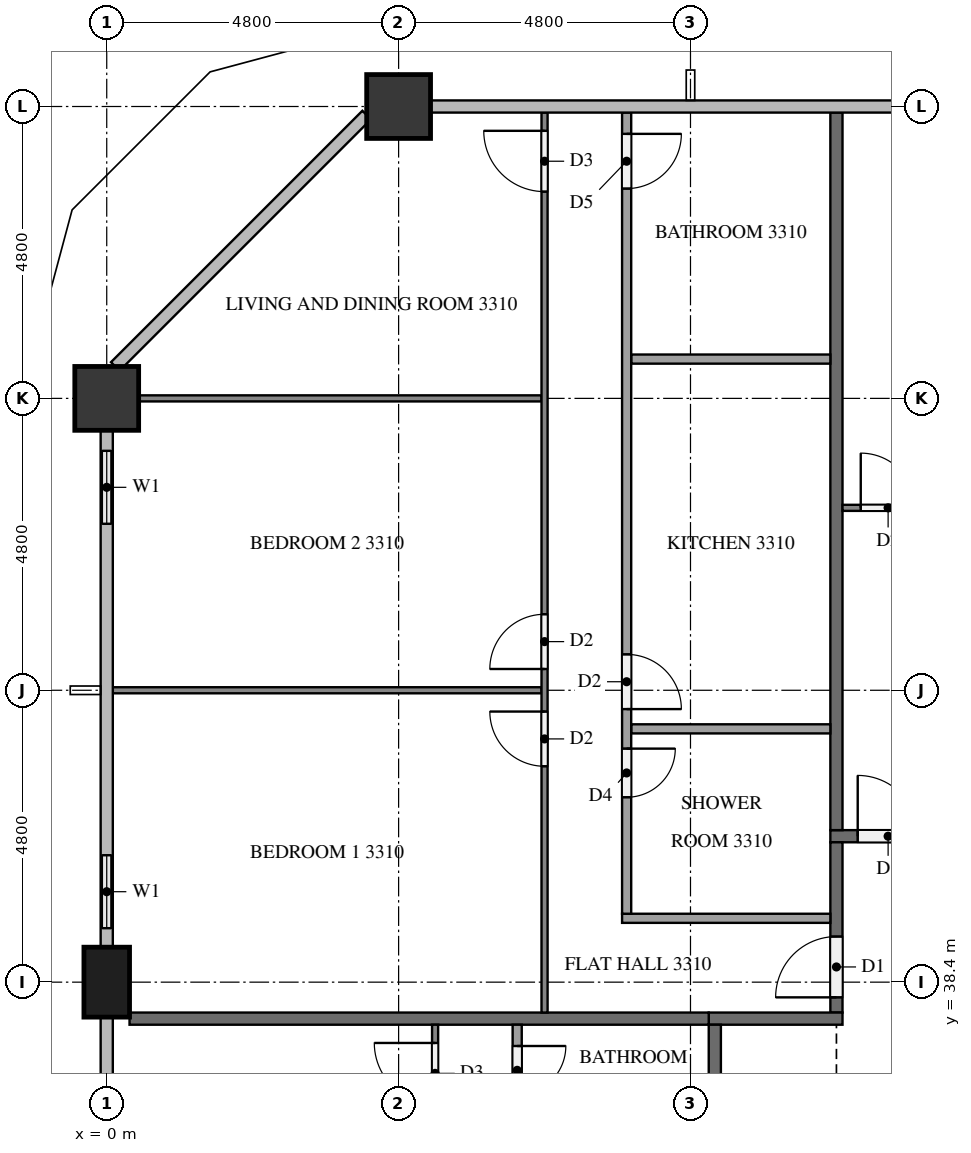
"""IFC4 building model, lengths in metres.
Left out: names, types, materials, properties, quantities, classifications, styles, units other than length and angle.
Written with IfcOpenShell. Run it as: python <this file> out.ifc"""

import sys

from ifc_helpers import new_model, si_unit, direction, frame, frame_2d, origin, origin_2d, place, context, subcontext, project, spatial, rectangle, extrude, element, fill, save


model = new_model("IFC4")
c1 = context("Model", 3, precision=1e-05, world=origin(), true_north=direction((0.0, 1.0)))
c2 = subcontext(c1, "Body", "Model", "MODEL_VIEW")
j1 = project(units=[si_unit("LENGTHUNIT", "METRE"), si_unit("PLANEANGLEUNIT", "RADIAN")], contexts=[c1])
p1 = place(None, origin())
s1 = spatial("IfcSite", under=j1, at=p1, CompositionType="ELEMENT")
p2 = place(p1, origin())
s2 = spatial("IfcBuilding", under=s1, at=p2, CompositionType="ELEMENT")
p3 = place(p2, frame((0.0, 0.0, 129.6)))
s3 = spatial("IfcBuildingStorey", under=s2, at=p3, CompositionType="ELEMENT", Elevation=129.6)
for number, where, z_axis, x_axis in (
    (1, (4.8, 52.8, 0.0), (0.0, 0.0, 1.0), (1.0, 0.0, 0.0)),
    (2, (0.0, 48.0, 0.0), (0.0, 0.0, 1.0), (1.0, 0.0, 0.0)),
):
    element("IfcColumn", number, at=place(p3, frame(where, z_axis=z_axis, x_axis=x_axis)), inside=s3, PredefinedType="COLUMN", context=c2, shape_type="SweptSolid", body=[
        extrude(rectangle(XDim=1.05, YDim=1.05, at=origin_2d()), origin(), (0.0, 0.0, 1.0), 3.2),
    ])
p4 = place(p3, frame((0.0, 38.4, 0.0), z_axis=(0.0, 0.0, 1.0), x_axis=(0.0, 1.0, 0.0)))
e3 = element("IfcColumn", 3, at=p4, inside=s3, PredefinedType="COLUMN", context=c2, shape_type="SweptSolid", body=[
    extrude(rectangle(XDim=1.15, YDim=0.75, at=origin_2d()), origin(), (0.0, 0.0, 1.0), 3.2),
])
p5 = place(p3, frame((0.0, 47.475, 0.0), z_axis=(0.0, 0.0, 1.0), x_axis=(0.0, -1.0, 0.0)))
e4 = element("IfcWall", 4, at=p5, inside=s3, PredefinedType="SOLIDWALL", context=c2, shape_type="SweptSolid", body=[
    extrude(rectangle(XDim=1.875, YDim=0.15, at=frame_2d((0.938, 0.0))), origin(), (0.0, 0.0, 1.0), 3.2),
])
p6 = place(p5, frame((0.337, 0.0, 0.9)))
e5 = element("IfcOpeningElement", 5, at=p6, cuts=e4, PredefinedType="OPENING", context=c2, shape_type="SweptSolid", body=[
    extrude(rectangle(XDim=1.2, YDim=1.4, at=frame_2d((0.6, 0.7))), frame((0.0, 0.085, 0.0), z_axis=(0.0, -1.0, 0.0), x_axis=(1.0, 0.0, 0.0)), (0.0, 0.0, 1.0), 0.17),
])
p7 = place(p3, frame((0.0, 40.8, 0.0), z_axis=(0.0, 0.0, 1.0), x_axis=(0.0, -1.0, 0.0)))
e6 = element("IfcWall", 6, at=p7, inside=s3, PredefinedType="SOLIDWALL", context=c2, shape_type="SweptSolid", body=[
    extrude(rectangle(XDim=1.825, YDim=0.15, at=frame_2d((0.913, 0.0))), origin(), (0.0, 0.0, 1.0), 3.2),
])
p8 = place(p7, frame((0.312, 0.0, 0.9)))
e7 = element("IfcOpeningElement", 7, at=p8, cuts=e6, PredefinedType="OPENING", context=c2, shape_type="SweptSolid", body=[
    extrude(rectangle(XDim=1.2, YDim=1.4, at=frame_2d((0.6, 0.7))), frame((0.0, 0.085, 0.0), z_axis=(0.0, -1.0, 0.0), x_axis=(1.0, 0.0, 0.0)), (0.0, 0.0, 1.0), 0.17),
])
p9 = place(p3, frame((11.9, 40.8, 0.0), z_axis=(0.0, 0.0, 1.0), x_axis=(1.0, 0.0, 0.0)))
e8 = element("IfcWall", 8, at=p9, inside=s3, PredefinedType="PARTITIONING", context=c2, shape_type="SweptSolid", body=[
    extrude(rectangle(XDim=38.6, YDim=0.2, at=frame_2d((19.3, 0.0))), origin(), (0.0, 0.0, 1.0), 3.2),
])
p10 = place(p9, frame((37.15, 0.0, 0.0)))
e9 = element("IfcOpeningElement", 9, at=p10, cuts=e8, PredefinedType="OPENING", context=c2, shape_type="SweptSolid", body=[
    extrude(rectangle(XDim=1.0, YDim=2.1, at=frame_2d((0.5, 1.05))), frame((0.0, 0.11, 0.0), z_axis=(0.0, -1.0, 0.0), x_axis=(1.0, 0.0, 0.0)), (0.0, 0.0, 1.0), 0.22),
])
p11 = place(p9, frame((10.05, 0.0, 0.0)))
e10 = element("IfcOpeningElement", 10, at=p11, cuts=e8, PredefinedType="OPENING", context=c2, shape_type="SweptSolid", body=[
    extrude(rectangle(XDim=1.0, YDim=2.1, at=frame_2d((0.5, 1.05))), frame((0.0, 0.11, 0.0), z_axis=(0.0, -1.0, 0.0), x_axis=(1.0, 0.0, 0.0)), (0.0, 0.0, 1.0), 0.22),
])
p12 = place(p9, frame((0.45, 0.0, 0.0)))
e11 = element("IfcOpeningElement", 11, at=p12, cuts=e8, PredefinedType="OPENING", context=c2, shape_type="SweptSolid", body=[
    extrude(rectangle(XDim=1.0, YDim=2.1, at=frame_2d((0.5, 1.05))), frame((0.0, 0.11, 0.0), z_axis=(0.0, -1.0, 0.0), x_axis=(1.0, 0.0, 0.0)), (0.0, 0.0, 1.0), 0.22),
])
p13 = place(p3, frame((12.0, 37.9, 0.0), z_axis=(0.0, 0.0, 1.0), x_axis=(0.0, 1.0, 0.0)))
e12 = element("IfcWall", 12, at=p13, inside=s3, PredefinedType="PARTITIONING", context=c2, shape_type="SweptSolid", body=[
    extrude(rectangle(XDim=2.8, YDim=0.2, at=frame_2d((1.4, 0.0))), origin(), (0.0, 0.0, 1.0), 3.2),
])
p14 = place(p13, frame((0.25, 0.0, 0.0)))
e13 = element("IfcOpeningElement", 13, at=p14, cuts=e12, PredefinedType="OPENING", context=c2, shape_type="SweptSolid", body=[
    extrude(rectangle(XDim=1.0, YDim=2.1, at=frame_2d((0.5, 1.05))), frame((0.0, 0.11, 0.0), z_axis=(0.0, -1.0, 0.0), x_axis=(1.0, 0.0, 0.0)), (0.0, 0.0, 1.0), 0.22),
])
p15 = place(p3, frame((12.1, 37.8, 0.0), z_axis=(0.0, 0.0, 1.0), x_axis=(-1.0, 0.0, 0.0)))
e14 = element("IfcWall", 14, at=p15, inside=s3, PredefinedType="PARTITIONING", context=c2, shape_type="SweptSolid", body=[
    extrude(rectangle(XDim=2.2, YDim=0.2, at=frame_2d((1.1, 0.0))), origin(), (0.0, 0.0, 1.0), 3.2),
])
p16 = place(p3, frame((10.0, 15.1, 0.0), z_axis=(0.0, 0.0, 1.0), x_axis=(0.0, 1.0, 0.0)))
e15 = element("IfcWall", 15, at=p16, inside=s3, PredefinedType="PARTITIONING", context=c2, shape_type="SweptSolid", body=[
    extrude(rectangle(XDim=22.6, YDim=0.2, at=frame_2d((11.3, 0.0))), origin(), (0.0, 0.0, 1.0), 3.2),
])
p17 = place(p16, frame((16.45, 0.0, 0.0)))
e16 = element("IfcOpeningElement", 16, at=p17, cuts=e15, PredefinedType="OPENING", context=c2, shape_type="SweptSolid", body=[
    extrude(rectangle(XDim=1.0, YDim=2.1, at=frame_2d((0.5, 1.05))), frame((0.0, 0.11, 0.0), z_axis=(0.0, -1.0, 0.0), x_axis=(1.0, 0.0, 0.0)), (0.0, 0.0, 1.0), 0.22),
])
p18 = place(p16, frame((0.25, 0.0, 0.0)))
e17 = element("IfcOpeningElement", 17, at=p18, cuts=e15, PredefinedType="OPENING", context=c2, shape_type="SweptSolid", body=[
    extrude(rectangle(XDim=1.0, YDim=2.1, at=frame_2d((0.5, 1.05))), frame((0.0, 0.11, 0.0), z_axis=(0.0, -1.0, 0.0), x_axis=(1.0, 0.0, 0.0)), (0.0, 0.0, 1.0), 0.22),
])
p19 = place(p3, frame((12.0, 52.7, 0.0), z_axis=(0.0, 0.0, 1.0), x_axis=(0.0, -1.0, 0.0)))
e18 = element("IfcWall", 18, at=p19, inside=s3, PredefinedType="PARTITIONING", context=c2, shape_type="SweptSolid", body=[
    extrude(rectangle(XDim=11.8, YDim=0.2, at=frame_2d((5.9, 0.0))), origin(), (0.0, 0.0, 1.0), 3.2),
])
p20 = place(p3, frame((0.375, 37.8, 0.0), z_axis=(0.0, 0.0, 1.0), x_axis=(1.0, 0.0, 0.0)))
e19 = element("IfcWall", 19, at=p20, inside=s3, PredefinedType="PARTITIONING", context=c2, shape_type="SweptSolid", body=[
    extrude(rectangle(XDim=9.525, YDim=0.2, at=frame_2d((4.762, 0.0))), origin(), (0.0, 0.0, 1.0), 3.2),
])
p21 = place(p3, frame((12.1, 46.2, 0.0), z_axis=(0.0, 0.0, 1.0), x_axis=(1.0, 0.0, 0.0)))
e20 = element("IfcWall", 20, at=p21, inside=s3, PredefinedType="PARTITIONING", context=c2, shape_type="SweptSolid", body=[
    extrude(rectangle(XDim=9.4, YDim=0.1, at=frame_2d((4.7, 0.0))), origin(), (0.0, 0.0, 1.0), 3.2),
])
p22 = place(p21, frame((0.3, 0.0, 0.0)))
e21 = element("IfcOpeningElement", 21, at=p22, cuts=e20, PredefinedType="OPENING", context=c2, shape_type="SweptSolid", body=[
    extrude(rectangle(XDim=0.9, YDim=2.1, at=frame_2d((0.45, 1.05))), frame((0.0, 0.06, 0.0), z_axis=(0.0, -1.0, 0.0), x_axis=(1.0, 0.0, 0.0)), (0.0, 0.0, 1.0), 0.12),
])
p23 = place(p21, frame((8.1, 0.0, 0.0)))
e22 = element("IfcOpeningElement", 22, at=p23, cuts=e20, PredefinedType="OPENING", context=c2, shape_type="SweptSolid", body=[
    extrude(rectangle(XDim=1.0, YDim=2.1, at=frame_2d((0.5, 1.05))), frame((0.0, 0.06, 0.0), z_axis=(0.0, -1.0, 0.0), x_axis=(1.0, 0.0, 0.0)), (0.0, 0.0, 1.0), 0.12),
])
p24 = place(p3, frame((7.15, 43.2, 0.0), z_axis=(0.0, 0.0, 1.0), x_axis=(-1.0, 0.0, 0.0)))
e23 = element("IfcWall", 23, at=p24, inside=s3, PredefinedType="PARTITIONING", context=c2, shape_type="SweptSolid", body=[
    extrude(rectangle(XDim=7.05, YDim=0.1, at=frame_2d((3.525, 0.0))), origin(), (0.0, 0.0, 1.0), 3.2),
])
p25 = place(p3, frame((7.15, 48.0, 0.0), z_axis=(0.0, 0.0, 1.0), x_axis=(-1.0, 0.0, 0.0)))
e24 = element("IfcWall", 24, at=p25, inside=s3, PredefinedType="PARTITIONING", context=c2, shape_type="SweptSolid", body=[
    extrude(rectangle(XDim=6.625, YDim=0.1, at=frame_2d((3.312, 0.0))), origin(), (0.0, 0.0, 1.0), 3.2),
])
p26 = place(p3, frame((7.2, 37.9, 0.0), z_axis=(0.0, 0.0, 1.0), x_axis=(0.0, 1.0, 0.0)))
e25 = element("IfcWall", 25, at=p26, inside=s3, PredefinedType="PARTITIONING", context=c2, shape_type="SweptSolid", body=[
    extrude(rectangle(XDim=14.8, YDim=0.1, at=frame_2d((7.4, 0.0))), origin(), (0.0, 0.0, 1.0), 3.2),
])
p27 = place(p26, frame((4.05, 0.0, 0.0)))
e26 = element("IfcOpeningElement", 26, at=p27, cuts=e25, PredefinedType="OPENING", context=c2, shape_type="SweptSolid", body=[
    extrude(rectangle(XDim=0.9, YDim=2.1, at=frame_2d((0.45, 1.05))), frame((0.0, 0.06, 0.0), z_axis=(0.0, -1.0, 0.0), x_axis=(1.0, 0.0, 0.0)), (0.0, 0.0, 1.0), 0.12),
])
p28 = place(p26, frame((5.65, 0.0, 0.0)))
e27 = element("IfcOpeningElement", 27, at=p28, cuts=e25, PredefinedType="OPENING", context=c2, shape_type="SweptSolid", body=[
    extrude(rectangle(XDim=0.9, YDim=2.1, at=frame_2d((0.45, 1.05))), frame((0.0, 0.06, 0.0), z_axis=(0.0, -1.0, 0.0), x_axis=(1.0, 0.0, 0.0)), (0.0, 0.0, 1.0), 0.12),
])
p29 = place(p26, frame((13.5, 0.0, 0.0)))
e28 = element("IfcOpeningElement", 28, at=p29, cuts=e25, PredefinedType="OPENING", context=c2, shape_type="SweptSolid", body=[
    extrude(rectangle(XDim=1.0, YDim=2.1, at=frame_2d((0.5, 1.05))), frame((0.0, 0.06, 0.0), z_axis=(0.0, -1.0, 0.0), x_axis=(1.0, 0.0, 0.0)), (0.0, 0.0, 1.0), 0.12),
])
for number, where, z_axis, x_axis in (
    (29, (11.9, 42.565, 0.0), (0.0, 0.0, 1.0), (-1.0, 0.0, 0.0)),
    (30, (11.9, 48.646, 0.0), (0.0, 0.0, 1.0), (-1.0, 0.0, 0.0)),
):
    element("IfcWall", number, at=place(p3, frame(where, z_axis=z_axis, x_axis=x_axis)), inside=s3, PredefinedType="PARTITIONING", context=c2, shape_type="SweptSolid", body=[
        extrude(rectangle(XDim=3.275, YDim=0.15, at=frame_2d((1.637, 0.0))), origin(), (0.0, 0.0, 1.0), 3.2),
    ])
p30 = place(p3, frame((11.9, 39.45, 0.0), z_axis=(0.0, 0.0, 1.0), x_axis=(-1.0, 0.0, 0.0)))
e31 = element("IfcWall", 31, at=p30, inside=s3, PredefinedType="PARTITIONING", context=c2, shape_type="SweptSolid", body=[
    extrude(rectangle(XDim=3.425, YDim=0.15, at=frame_2d((1.712, 0.0))), origin(), (0.0, 0.0, 1.0), 3.2),
])
p31 = place(p3, frame((8.55, 52.7, 0.0), z_axis=(0.0, 0.0, 1.0), x_axis=(0.0, -1.0, 0.0)))
e32 = element("IfcWall", 32, at=p31, inside=s3, PredefinedType="PARTITIONING", context=c2, shape_type="SweptSolid", body=[
    extrude(rectangle(XDim=13.175, YDim=0.15, at=frame_2d((6.587, 0.0))), origin(), (0.0, 0.0, 1.0), 3.2),
])
p32 = place(p31, frame((10.46, 0.0, 0.0)))
e33 = element("IfcOpeningElement", 33, at=p32, cuts=e32, PredefinedType="OPENING", context=c2, shape_type="SweptSolid", body=[
    extrude(rectangle(XDim=0.8, YDim=2.1, at=frame_2d((0.4, 1.05))), frame((0.0, 0.085, 0.0), z_axis=(0.0, -1.0, 0.0), x_axis=(1.0, 0.0, 0.0)), (0.0, 0.0, 1.0), 0.17),
])
p33 = place(p31, frame((8.91, 0.0, 0.0)))
e34 = element("IfcOpeningElement", 34, at=p33, cuts=e32, PredefinedType="OPENING", context=c2, shape_type="SweptSolid", body=[
    extrude(rectangle(XDim=0.9, YDim=2.1, at=frame_2d((0.45, 1.05))), frame((0.0, 0.085, 0.0), z_axis=(0.0, -1.0, 0.0), x_axis=(1.0, 0.0, 0.0)), (0.0, 0.0, 1.0), 0.17),
])
p34 = place(p31, frame((0.35, 0.0, 0.0)))
e35 = element("IfcOpeningElement", 35, at=p34, cuts=e32, PredefinedType="OPENING", context=c2, shape_type="SweptSolid", body=[
    extrude(rectangle(XDim=0.9, YDim=2.1, at=frame_2d((0.45, 1.05))), frame((0.0, 0.085, 0.0), z_axis=(0.0, -1.0, 0.0), x_axis=(1.0, 0.0, 0.0)), (0.0, 0.0, 1.0), 0.17),
])
p35 = place(p3, frame((5.4, 31.3, 0.0), z_axis=(0.0, 0.0, 1.0), x_axis=(0.0, 1.0, 0.0)))
e36 = element("IfcWall", 36, at=p35, inside=s3, PredefinedType="PARTITIONING", context=c2, shape_type="SweptSolid", body=[
    extrude(rectangle(XDim=6.4, YDim=0.1, at=frame_2d((3.2, 0.0))), origin(), (0.0, 0.0, 1.0), 3.2),
])
p36 = place(p35, frame((5.1, 0.0, 0.0)))
e37 = element("IfcOpeningElement", 37, at=p36, cuts=e36, PredefinedType="OPENING", context=c2, shape_type="SweptSolid", body=[
    extrude(rectangle(XDim=1.0, YDim=2.1, at=frame_2d((0.5, 1.05))), frame((0.0, 0.06, 0.0), z_axis=(0.0, -1.0, 0.0), x_axis=(1.0, 0.0, 0.0)), (0.0, 0.0, 1.0), 0.12),
])
p37 = place(p3, frame((6.75, 37.7, 0.0), z_axis=(0.0, 0.0, 1.0), x_axis=(0.0, -1.0, 0.0)))
e38 = element("IfcWall", 38, at=p37, inside=s3, PredefinedType="PARTITIONING", context=c2, shape_type="SweptSolid", body=[
    extrude(rectangle(XDim=4.775, YDim=0.15, at=frame_2d((2.387, 0.0))), origin(), (0.0, 0.0, 1.0), 3.2),
])
p38 = place(p37, frame((3.575, 0.0, 0.0)))
e39 = element("IfcOpeningElement", 39, at=p38, cuts=e38, PredefinedType="OPENING", context=c2, shape_type="SweptSolid", body=[
    extrude(rectangle(XDim=0.9, YDim=2.1, at=frame_2d((0.45, 1.05))), frame((0.0, 0.085, 0.0), z_axis=(0.0, -1.0, 0.0), x_axis=(1.0, 0.0, 0.0)), (0.0, 0.0, 1.0), 0.17),
])
p39 = place(p37, frame((0.35, 0.0, 0.0)))
e40 = element("IfcOpeningElement", 40, at=p39, cuts=e38, PredefinedType="OPENING", context=c2, shape_type="SweptSolid", body=[
    extrude(rectangle(XDim=0.8, YDim=2.1, at=frame_2d((0.4, 1.05))), frame((0.0, 0.085, 0.0), z_axis=(0.0, -1.0, 0.0), x_axis=(1.0, 0.0, 0.0)), (0.0, 0.0, 1.0), 0.17),
])
p40 = place(p6, origin())
e41 = element("IfcWindow", 41, at=p40, inside=s3, PartitioningType="SINGLE_PANEL", PredefinedType="WINDOW", context=c2, shape_type="SweptSolid", body=[
    extrude(rectangle(XDim=1.2, YDim=1.4, at=frame_2d((0.6, 0.7))), frame((0.0, 0.03, 0.0), z_axis=(0.0, -1.0, 0.0), x_axis=(1.0, 0.0, 0.0)), (0.0, 0.0, 1.0), 0.06),
])
fill(e5, e41)
p41 = place(p8, origin())
e42 = element("IfcWindow", 42, at=p41, inside=s3, PartitioningType="SINGLE_PANEL", PredefinedType="WINDOW", context=c2, shape_type="SweptSolid", body=[
    extrude(rectangle(XDim=1.2, YDim=1.4, at=frame_2d((0.6, 0.7))), frame((0.0, 0.03, 0.0), z_axis=(0.0, -1.0, 0.0), x_axis=(1.0, 0.0, 0.0)), (0.0, 0.0, 1.0), 0.06),
])
fill(e7, e42)
p42 = place(p12, origin())
e43 = element("IfcDoor", 43, at=p42, inside=s3, OperationType="SINGLE_SWING_LEFT", PredefinedType="DOOR", context=c2, shape_type="SweptSolid", body=[
    extrude(rectangle(XDim=1.0, YDim=2.1, at=frame_2d((0.5, 1.05))), frame((0.0, 0.025, 0.0), z_axis=(0.0, -1.0, 0.0), x_axis=(1.0, 0.0, 0.0)), (0.0, 0.0, 1.0), 0.05),
])
fill(e11, e43)
p43 = place(p14, origin())
e44 = element("IfcDoor", 44, at=p43, inside=s3, OperationType="SINGLE_SWING_LEFT", PredefinedType="DOOR", context=c2, shape_type="SweptSolid", body=[
    extrude(rectangle(XDim=1.0, YDim=2.1, at=frame_2d((0.5, 1.05))), frame((0.0, 0.025, 0.0), z_axis=(0.0, -1.0, 0.0), x_axis=(1.0, 0.0, 0.0)), (0.0, 0.0, 1.0), 0.05),
])
fill(e13, e44)
p44 = place(p22, origin())
e45 = element("IfcDoor", 45, at=p44, inside=s3, OperationType="SINGLE_SWING_LEFT", PredefinedType="DOOR", context=c2, shape_type="SweptSolid", body=[
    extrude(rectangle(XDim=0.9, YDim=2.1, at=frame_2d((0.45, 1.05))), frame((0.0, 0.025, 0.0), z_axis=(0.0, -1.0, 0.0), x_axis=(1.0, 0.0, 0.0)), (0.0, 0.0, 1.0), 0.05),
])
fill(e21, e45)
p45 = place(p27, origin())
e46 = element("IfcDoor", 46, at=p45, inside=s3, OperationType="SINGLE_SWING_RIGHT", PredefinedType="DOOR", context=c2, shape_type="SweptSolid", body=[
    extrude(rectangle(XDim=0.9, YDim=2.1, at=frame_2d((0.45, 1.05))), frame((0.0, 0.025, 0.0), z_axis=(0.0, -1.0, 0.0), x_axis=(1.0, 0.0, 0.0)), (0.0, 0.0, 1.0), 0.05),
])
fill(e26, e46)
p46 = place(p28, origin())
e47 = element("IfcDoor", 47, at=p46, inside=s3, OperationType="SINGLE_SWING_LEFT", PredefinedType="DOOR", context=c2, shape_type="SweptSolid", body=[
    extrude(rectangle(XDim=0.9, YDim=2.1, at=frame_2d((0.45, 1.05))), frame((0.0, 0.025, 0.0), z_axis=(0.0, -1.0, 0.0), x_axis=(1.0, 0.0, 0.0)), (0.0, 0.0, 1.0), 0.05),
])
fill(e27, e47)
p47 = place(p29, origin())
e48 = element("IfcDoor", 48, at=p47, inside=s3, OperationType="SINGLE_SWING_RIGHT", PredefinedType="DOOR", context=c2, shape_type="SweptSolid", body=[
    extrude(rectangle(XDim=1.0, YDim=2.1, at=frame_2d((0.5, 1.05))), frame((0.0, 0.025, 0.0), z_axis=(0.0, -1.0, 0.0), x_axis=(1.0, 0.0, 0.0)), (0.0, 0.0, 1.0), 0.05),
])
fill(e28, e48)
p48 = place(p32, origin())
e49 = element("IfcDoor", 49, at=p48, inside=s3, OperationType="SINGLE_SWING_LEFT", PredefinedType="DOOR", context=c2, shape_type="SweptSolid", body=[
    extrude(rectangle(XDim=0.8, YDim=2.1, at=frame_2d((0.4, 1.05))), frame((0.0, 0.025, 0.0), z_axis=(0.0, -1.0, 0.0), x_axis=(1.0, 0.0, 0.0)), (0.0, 0.0, 1.0), 0.05),
])
fill(e33, e49)
p49 = place(p33, origin())
e50 = element("IfcDoor", 50, at=p49, inside=s3, OperationType="SINGLE_SWING_RIGHT", PredefinedType="DOOR", context=c2, shape_type="SweptSolid", body=[
    extrude(rectangle(XDim=0.9, YDim=2.1, at=frame_2d((0.45, 1.05))), frame((0.0, 0.025, 0.0), z_axis=(0.0, -1.0, 0.0), x_axis=(1.0, 0.0, 0.0)), (0.0, 0.0, 1.0), 0.05),
])
fill(e34, e50)
p50 = place(p34, origin())
e51 = element("IfcDoor", 51, at=p50, inside=s3, OperationType="SINGLE_SWING_LEFT", PredefinedType="DOOR", context=c2, shape_type="SweptSolid", body=[
    extrude(rectangle(XDim=0.9, YDim=2.1, at=frame_2d((0.45, 1.05))), frame((0.0, 0.025, 0.0), z_axis=(0.0, -1.0, 0.0), x_axis=(1.0, 0.0, 0.0)), (0.0, 0.0, 1.0), 0.05),
])
fill(e35, e51)
p51 = place(p36, origin())
e52 = element("IfcDoor", 52, at=p51, inside=s3, OperationType="SINGLE_SWING_RIGHT", PredefinedType="DOOR", context=c2, shape_type="SweptSolid", body=[
    extrude(rectangle(XDim=1.0, YDim=2.1, at=frame_2d((0.5, 1.05))), frame((0.0, 0.025, 0.0), z_axis=(0.0, -1.0, 0.0), x_axis=(1.0, 0.0, 0.0)), (0.0, 0.0, 1.0), 0.05),
])
fill(e37, e52)
p52 = place(p39, origin())
e53 = element("IfcDoor", 53, at=p52, inside=s3, OperationType="SINGLE_SWING_LEFT", PredefinedType="DOOR", context=c2, shape_type="SweptSolid", body=[
    extrude(rectangle(XDim=0.8, YDim=2.1, at=frame_2d((0.4, 1.05))), frame((0.0, 0.025, 0.0), z_axis=(0.0, -1.0, 0.0), x_axis=(1.0, 0.0, 0.0)), (0.0, 0.0, 1.0), 0.05),
])
fill(e40, e53)
save(model, sys.argv[1])
